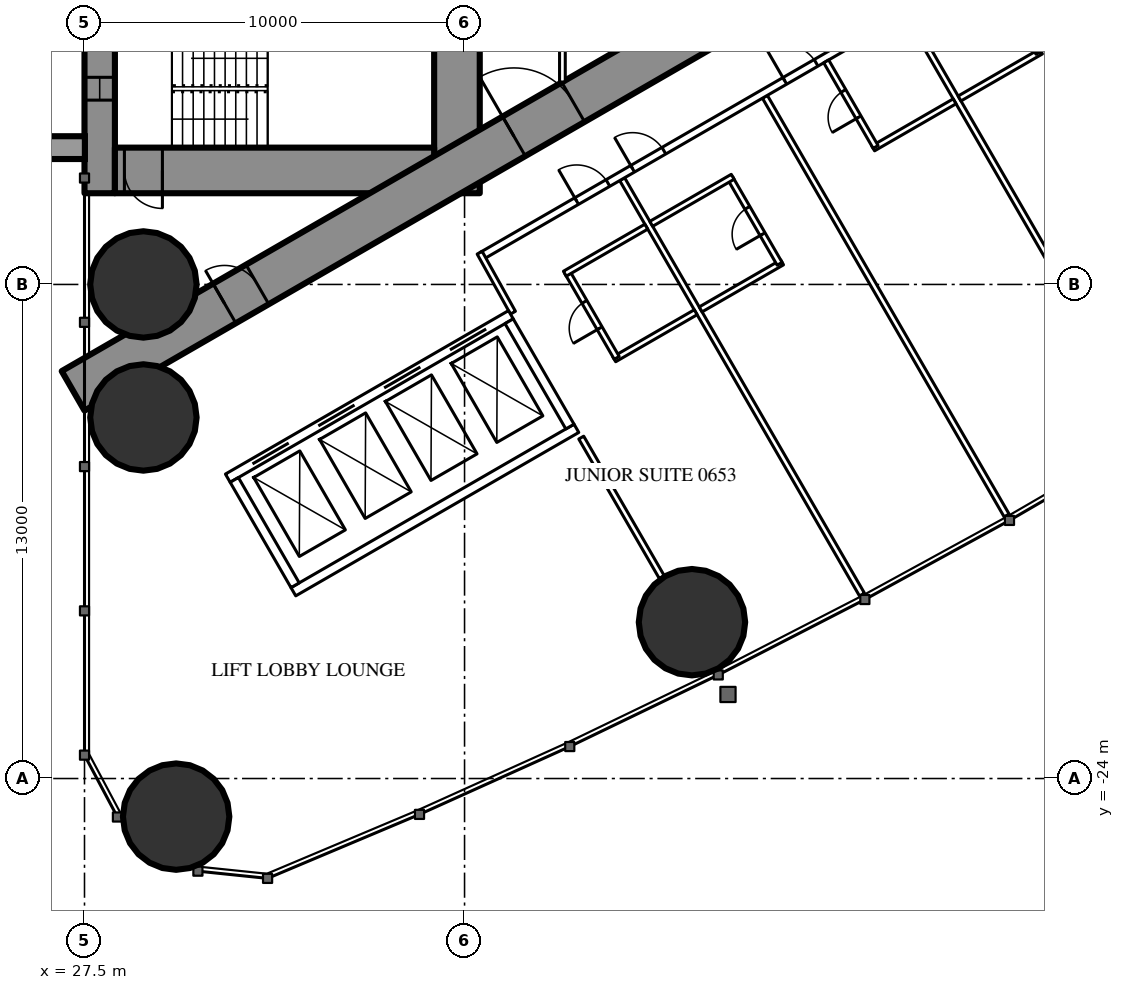
"""IFC4 building model, lengths in metres.
Left out: names, types, materials, properties, quantities, classifications, styles, units other than length and angle.
Written with IfcOpenShell. Run it as: python <this file> out.ifc"""

import sys

from ifc_helpers import new_model, si_unit, direction, frame, frame_2d, origin, origin_2d, place, context, subcontext, project, spatial, rectangle, hollow_circle, extrude, element, fill, save


model = new_model("IFC4")
c1 = context("Model", 3, precision=1e-05, world=origin(), true_north=direction((0.0, 1.0)))
c2 = subcontext(c1, "Body", "Model", "MODEL_VIEW")
j1 = project(units=[si_unit("LENGTHUNIT", "METRE"), si_unit("PLANEANGLEUNIT", "RADIAN")], contexts=[c1])
p1 = place(None, origin())
s1 = spatial("IfcSite", under=j1, at=p1, CompositionType="ELEMENT")
p2 = place(p1, origin())
s2 = spatial("IfcBuilding", under=s1, at=p2, CompositionType="ELEMENT")
p3 = place(p2, frame((0.0, 0.0, 28.5)))
s3 = spatial("IfcBuildingStorey", under=s2, at=p3, CompositionType="ELEMENT", Elevation=28.5)
for number, where, z_axis, x_axis in (
    (1, (29.911, -25.002, 0.0), (0.0, 0.0, 1.0), (1.0, 0.0, 0.0)),
    (2, (29.05, -11.0, 0.0), (0.0, 0.0, 1.0), (1.0, 0.0, 0.0)),
    (3, (29.05, -14.5, 0.0), (0.0, 0.0, 1.0), (1.0, 0.0, 0.0)),
    (4, (43.484, -19.886, 0.0), (0.0, 0.0, 1.0), (1.0, 0.0, 0.0)),
):
    element("IfcColumn", number, at=place(p3, frame(where, z_axis=z_axis, x_axis=x_axis)), inside=s3, PredefinedType="COLUMN", context=c2, shape_type="SweptSolid", body=[
        extrude(hollow_circle(Radius=1.4, WallThickness=0.12, at=origin_2d()), origin(), (0.0, 0.0, 1.0), 3.5),
    ])
p4 = place(p3, frame((27.9, -8.6, 0.0), z_axis=(0.0, 0.0, 1.0), x_axis=(0.0, 1.0, 0.0)))
e5 = element("IfcWall", 5, at=p4, inside=s3, PredefinedType="SHEAR", context=c2, shape_type="SweptSolid", body=[
    extrude(rectangle(XDim=17.2, YDim=0.8, at=frame_2d((8.6, 0.0))), origin(), (0.0, 0.0, 1.0), 3.5),
])
p5 = place(p4, frame((2.45, 0.0, 0.6)))
e6 = element("IfcOpeningElement", 6, at=p5, cuts=e5, PredefinedType="OPENING", context=c2, shape_type="SweptSolid", body=[
    extrude(rectangle(XDim=0.6, YDim=2.1, at=frame_2d((0.3, 1.05))), frame((0.0, 0.41, 0.0), z_axis=(0.0, -1.0, 0.0), x_axis=(1.0, 0.0, 0.0)), (0.0, 0.0, 1.0), 0.82),
])
p6 = place(p4, frame((14.15, 0.0, 0.6)))
e7 = element("IfcOpeningElement", 7, at=p6, cuts=e5, PredefinedType="OPENING", context=c2, shape_type="SweptSolid", body=[
    extrude(rectangle(XDim=0.6, YDim=2.1, at=frame_2d((0.3, 1.05))), frame((0.0, 0.41, 0.0), z_axis=(0.0, -1.0, 0.0), x_axis=(1.0, 0.0, 0.0)), (0.0, 0.0, 1.0), 0.82),
])
p7 = place(p3, frame((37.3, -8.6, 0.0), z_axis=(0.0, 0.0, 1.0), x_axis=(0.0, 1.0, 0.0)))
e8 = element("IfcWall", 8, at=p7, inside=s3, PredefinedType="SHEAR", context=c2, shape_type="SweptSolid", body=[
    extrude(rectangle(XDim=17.2, YDim=1.2, at=frame_2d((8.6, 0.0))), origin(), (0.0, 0.0, 1.0), 3.5),
])
p8 = place(p7, frame((7.7, 0.0, 0.0)))
e9 = element("IfcOpeningElement", 9, at=p8, cuts=e8, PredefinedType="OPENING", context=c2, shape_type="SweptSolid", body=[
    extrude(rectangle(XDim=1.8, YDim=2.2, at=frame_2d((0.9, 1.1))), frame((0.0, 0.61, 0.0), z_axis=(0.0, -1.0, 0.0), x_axis=(1.0, 0.0, 0.0)), (0.0, 0.0, 1.0), 1.22),
])
p9 = place(p3, frame((28.3, -8.0, 0.0), z_axis=(0.0, 0.0, 1.0), x_axis=(1.0, 0.0, 0.0)))
e10 = element("IfcWall", 10, at=p9, inside=s3, PredefinedType="SHEAR", context=c2, shape_type="SweptSolid", body=[
    extrude(rectangle(XDim=8.4, YDim=1.2, at=frame_2d((4.2, 0.0))), origin(), (0.0, 0.0, 1.0), 3.5),
])
p10 = place(p9, frame((0.25, 0.0, 0.0)))
e11 = element("IfcOpeningElement", 11, at=p10, cuts=e10, PredefinedType="OPENING", context=c2, shape_type="SweptSolid", body=[
    extrude(rectangle(XDim=1.0, YDim=2.2, at=frame_2d((0.5, 1.1))), frame((0.0, 0.61, 0.0), z_axis=(0.0, -1.0, 0.0), x_axis=(1.0, 0.0, 0.0)), (0.0, 0.0, 1.0), 1.22),
])
p11 = place(p3, frame((27.2, -13.8, 0.0), z_axis=(0.0, 0.0, 1.0), x_axis=(0.866027159892, 0.499996958321, 0.0)))
e12 = element("IfcWall", 12, at=p11, inside=s3, PredefinedType="SHEAR", context=c2, shape_type="SweptSolid", body=[
    extrude(rectangle(XDim=27.947, YDim=1.2, at=frame_2d((13.973, 0.0))), origin(), (0.0, 0.0, 1.0), 3.5),
])
p12 = place(p11, frame((4.6, 0.0, 0.0)))
e13 = element("IfcOpeningElement", 13, at=p12, cuts=e12, PredefinedType="OPENING", context=c2, shape_type="SweptSolid", body=[
    extrude(rectangle(XDim=1.0, YDim=2.2, at=frame_2d((0.5, 1.1))), frame((0.0, 0.61, 0.0), z_axis=(0.0, -1.0, 0.0), x_axis=(1.0, 0.0, 0.0)), (0.0, 0.0, 1.0), 1.22),
])
p13 = place(p11, frame((13.395, 0.0, 0.0)))
e14 = element("IfcOpeningElement", 14, at=p13, cuts=e12, PredefinedType="OPENING", context=c2, shape_type="SweptSolid", body=[
    extrude(rectangle(XDim=1.8, YDim=2.2, at=frame_2d((0.9, 1.1))), frame((0.0, 0.61, 0.0), z_axis=(0.0, -1.0, 0.0), x_axis=(1.0, 0.0, 0.0)), (0.0, 0.0, 1.0), 1.22),
])
p14 = place(p3, frame((41.647, -8.23, 0.0), z_axis=(0.0, 0.0, 1.0), x_axis=(0.49998590462, -0.866033541603, 0.0)))
e15 = element("IfcWall", 15, at=p14, inside=s3, PredefinedType="PARTITIONING", context=c2, shape_type="SweptSolid", body=[
    extrude(rectangle(XDim=12.621, YDim=0.15, at=frame_2d((6.311, 0.0))), origin(), (0.0, 0.0, 1.0), 3.25),
])
p15 = place(p3, frame((45.403, -6.062, 0.0), z_axis=(0.0, 0.0, 1.0), x_axis=(0.500007077968, -0.866021317279, 0.0)))
e16 = element("IfcWall", 16, at=p15, inside=s3, PredefinedType="PARTITIONING", context=c2, shape_type="SweptSolid", body=[
    extrude(rectangle(XDim=12.721, YDim=0.15, at=frame_2d((6.361, 0.0))), origin(), (0.0, 0.0, 1.0), 3.25),
])
p16 = place(p3, frame((49.159, -3.893, 0.0), z_axis=(0.0, 0.0, 1.0), x_axis=(0.499998773722, -0.866026111775, 0.0)))
e17 = element("IfcWall", 17, at=p16, inside=s3, PredefinedType="PARTITIONING", context=c2, shape_type="SweptSolid", body=[
    extrude(rectangle(XDim=9.892, YDim=0.15, at=frame_2d((4.946, 0.0))), origin(), (0.0, 0.0, 1.0), 2.25),
])
p17 = place(p3, frame((40.57, -15.03, 0.0), z_axis=(0.0, 0.0, 1.0), x_axis=(0.500012993597, -0.866017901798, 0.0)))
e18 = element("IfcWall", 18, at=p17, inside=s3, PredefinedType="PARTITIONING", context=c2, shape_type="SweptSolid", body=[
    extrude(rectangle(XDim=4.243, YDim=0.15, at=frame_2d((2.122, 0.0))), origin(), (0.0, 0.0, 1.0), 3.25),
])
p18 = place(p3, frame((37.96, -10.243, 0.0), z_axis=(0.0, 0.0, 1.0), x_axis=(0.866026429433, 0.499998223521, 0.0)))
e19 = element("IfcWall", 19, at=p18, inside=s3, PredefinedType="PARTITIONING", context=c2, shape_type="SweptSolid", body=[
    extrude(rectangle(XDim=20.487, YDim=0.2, at=frame_2d((10.243, 0.0))), origin(), (0.0, 0.0, 1.0), 3.25),
])
p19 = place(p18, frame((4.575, 0.0, 0.0)))
e20 = element("IfcOpeningElement", 20, at=p19, cuts=e19, PredefinedType="OPENING", context=c2, shape_type="SweptSolid", body=[
    extrude(rectangle(XDim=0.95, YDim=2.2, at=frame_2d((0.475, 1.1))), frame((0.0, 0.11, 0.0), z_axis=(0.0, -1.0, 0.0), x_axis=(1.0, 0.0, 0.0)), (0.0, 0.0, 1.0), 0.22),
])
p20 = place(p18, frame((9.199, 0.0, 0.0)))
e21 = element("IfcOpeningElement", 21, at=p20, cuts=e19, PredefinedType="OPENING", context=c2, shape_type="SweptSolid", body=[
    extrude(rectangle(XDim=0.95, YDim=2.2, at=frame_2d((0.475, 1.1))), frame((0.0, 0.11, 0.0), z_axis=(0.0, -1.0, 0.0), x_axis=(1.0, 0.0, 0.0)), (0.0, 0.0, 1.0), 0.22),
])
p21 = place(p18, frame((15.599, 0.0, 0.0)))
e22 = element("IfcOpeningElement", 22, at=p21, cuts=e19, PredefinedType="OPENING", context=c2, shape_type="SweptSolid", body=[
    extrude(rectangle(XDim=0.95, YDim=2.2, at=frame_2d((0.475, 1.1))), frame((0.0, 0.11, 0.0), z_axis=(0.0, -1.0, 0.0), x_axis=(1.0, 0.0, 0.0)), (0.0, 0.0, 1.0), 0.22),
])
p22 = place(p18, frame((2.875, 0.0, 0.0)))
e23 = element("IfcOpeningElement", 23, at=p22, cuts=e19, PredefinedType="OPENING", context=c2, shape_type="SweptSolid", body=[
    extrude(rectangle(XDim=0.95, YDim=2.2, at=frame_2d((0.475, 1.1))), frame((0.0, 0.11, 0.0), z_axis=(0.0, -1.0, 0.0), x_axis=(1.0, 0.0, 0.0)), (0.0, 0.0, 1.0), 0.22),
])
p23 = place(p3, frame((38.773, -11.742, 0.0), z_axis=(0.0, 0.0, 1.0), x_axis=(-0.485528096672, 0.8742210632, 0.0)))
e24 = element("IfcWall", 24, at=p23, inside=s3, PredefinedType="PARTITIONING", context=c2, shape_type="SweptSolid", body=[
    extrude(rectangle(XDim=1.805, YDim=0.15, at=frame_2d((0.903, 0.0))), origin(), (0.0, 0.0, 1.0), 3.25),
])
p24 = place(p3, frame((43.712, -11.657, 0.0), z_axis=(0.0, 0.0, 1.0), x_axis=(0.866006523861, 0.500032699561, 0.0)))
e25 = element("IfcWall", 25, at=p24, inside=s3, PredefinedType="PARTITIONING", context=c2, shape_type="SweptSolid", body=[
    extrude(rectangle(XDim=2.475, YDim=0.15, at=frame_2d((1.237, 0.0))), origin(), (0.0, 0.0, 1.0), 3.25),
])
p25 = place(p3, frame((44.491, -8.205, 0.0), z_axis=(0.0, 0.0, 1.0), x_axis=(0.500047596559, -0.865997922154, 0.0)))
e26 = element("IfcWall", 26, at=p25, inside=s3, PredefinedType="PARTITIONING", context=c2, shape_type="SweptSolid", body=[
    extrude(rectangle(XDim=2.6, YDim=0.15, at=frame_2d((1.3, 0.0))), origin(), (0.0, 0.0, 1.0), 3.25),
])
p26 = place(p25, frame((0.9, 0.0, 0.0)))
e27 = element("IfcOpeningElement", 27, at=p26, cuts=e26, PredefinedType="OPENING", context=c2, shape_type="SweptSolid", body=[
    extrude(rectangle(XDim=0.8, YDim=2.2, at=frame_2d((0.4, 1.1))), frame((0.0, 0.085, 0.0), z_axis=(0.0, -1.0, 0.0), x_axis=(1.0, 0.0, 0.0)), (0.0, 0.0, 1.0), 0.17),
])
for number, where, z_axis, x_axis in (
    (28, (42.412, -9.405, 0.0), (0.0, 0.0, 1.0), (0.866, 0.5, 0.0)),
    (29, (48.251, -7.42, 0.0), (0.0, 0.0, 1.0), (0.866, 0.5, 0.0)),
):
    element("IfcWall", number, at=place(p3, frame(where, z_axis=z_axis, x_axis=x_axis)), inside=s3, PredefinedType="PARTITIONING", context=c2, shape_type="SweptSolid", body=[
        extrude(rectangle(XDim=2.475, YDim=0.15, at=frame_2d((1.237, 0.0))), origin(), (0.0, 0.0, 1.0), 3.25),
    ])
p27 = place(p3, frame((47.016, -5.13, 0.0), z_axis=(0.0, 0.0, 1.0), x_axis=(0.500006934395, -0.866021400173, 0.0)))
e30 = element("IfcWall", 30, at=p27, inside=s3, PredefinedType="PARTITIONING", context=c2, shape_type="SweptSolid", body=[
    extrude(rectangle(XDim=2.6, YDim=0.15, at=frame_2d((1.3, 0.0))), origin(), (0.0, 0.0, 1.0), 3.25),
])
p28 = place(p27, frame((0.9, 0.0, 0.0)))
e31 = element("IfcOpeningElement", 31, at=p28, cuts=e30, PredefinedType="OPENING", context=c2, shape_type="SweptSolid", body=[
    extrude(rectangle(XDim=0.8, YDim=2.2, at=frame_2d((0.4, 1.1))), frame((0.0, 0.085, 0.0), z_axis=(0.0, -1.0, 0.0), x_axis=(1.0, 0.0, 0.0)), (0.0, 0.0, 1.0), 0.17),
])
p29 = place(p3, frame((50.524, -6.107, 0.0), z_axis=(0.0, 0.0, 1.0), x_axis=(0.866031185235, 0.4999899861, 0.0)))
e32 = element("IfcWall", 32, at=p29, inside=s3, PredefinedType="PARTITIONING", context=c2, shape_type="SweptSolid", body=[
    extrude(rectangle(XDim=2.475, YDim=0.15, at=frame_2d((1.238, 0.0))), origin(), (0.0, 0.0, 1.0), 3.25),
])
p30 = place(p3, frame((51.303, -2.656, 0.0), z_axis=(0.0, 0.0, 1.0), x_axis=(0.500047596559, -0.865997922154, 0.0)))
e33 = element("IfcWall", 33, at=p30, inside=s3, PredefinedType="PARTITIONING", context=c2, shape_type="SweptSolid", body=[
    extrude(rectangle(XDim=2.6, YDim=0.15, at=frame_2d((1.3, 0.0))), origin(), (0.0, 0.0, 1.0), 3.25),
])
p31 = place(p30, frame((0.9, 0.0, 0.0)))
e34 = element("IfcOpeningElement", 34, at=p31, cuts=e33, PredefinedType="OPENING", context=c2, shape_type="SweptSolid", body=[
    extrude(rectangle(XDim=0.8, YDim=2.2, at=frame_2d((0.4, 1.1))), frame((0.0, 0.085, 0.0), z_axis=(0.0, -1.0, 0.0), x_axis=(1.0, 0.0, 0.0)), (0.0, 0.0, 1.0), 0.17),
])
p32 = place(p3, frame((41.439, -12.969, 0.0), z_axis=(0.0, 0.0, 1.0), x_axis=(0.866031185235, 0.4999899861, 0.0)))
e35 = element("IfcWall", 35, at=p32, inside=s3, PredefinedType="PARTITIONING", context=c2, shape_type="SweptSolid", body=[
    extrude(rectangle(XDim=2.475, YDim=0.15, at=frame_2d((1.238, 0.0))), origin(), (0.0, 0.0, 1.0), 3.25),
])
p33 = place(p3, frame((40.204, -10.68, 0.0), z_axis=(0.0, 0.0, 1.0), x_axis=(0.500006934395, -0.866021400173, 0.0)))
e36 = element("IfcWall", 36, at=p33, inside=s3, PredefinedType="PARTITIONING", context=c2, shape_type="SweptSolid", body=[
    extrude(rectangle(XDim=2.6, YDim=0.15, at=frame_2d((1.3, 0.0))), origin(), (0.0, 0.0, 1.0), 3.25),
])
p34 = place(p33, frame((0.9, 0.0, 0.0)))
e37 = element("IfcOpeningElement", 37, at=p34, cuts=e36, PredefinedType="OPENING", context=c2, shape_type="SweptSolid", body=[
    extrude(rectangle(XDim=0.8, YDim=2.2, at=frame_2d((0.4, 1.1))), frame((0.0, 0.085, 0.0), z_axis=(0.0, -1.0, 0.0), x_axis=(1.0, 0.0, 0.0)), (0.0, 0.0, 1.0), 0.17),
])
p35 = place(p3, frame((40.139, -10.718, 0.0), z_axis=(0.0, 0.0, 1.0), x_axis=(0.866031185235, 0.4999899861, 0.0)))
e38 = element("IfcWall", 38, at=p35, inside=s3, PredefinedType="PARTITIONING", context=c2, shape_type="SweptSolid", body=[
    extrude(rectangle(XDim=2.475, YDim=0.15, at=frame_2d((1.238, 0.0))), origin(), (0.0, 0.0, 1.0), 3.25),
])
p36 = place(p3, frame((40.075, -5.674, 0.0), z_axis=(0.0, 0.0, 1.0), x_axis=(0.0, 1.0, 0.0)))
e39 = element("IfcWall", 39, at=p36, inside=s3, PredefinedType="PARTITIONING", context=c2, shape_type="SweptSolid", body=[
    extrude(rectangle(XDim=6.874, YDim=0.15, at=frame_2d((3.437, 0.0))), origin(), (0.0, 0.0, 1.0), 3.25),
])
p37 = place(p36, frame((2.537, 0.0, 0.0)))
e40 = element("IfcOpeningElement", 40, at=p37, cuts=e39, PredefinedType="OPENING", context=c2, shape_type="SweptSolid", body=[
    extrude(rectangle(XDim=1.8, YDim=2.2, at=frame_2d((0.9, 1.1))), frame((0.0, 0.085, 0.0), z_axis=(0.0, -1.0, 0.0), x_axis=(1.0, 0.0, 0.0)), (0.0, 0.0, 1.0), 0.17),
])
p38 = place(p3, frame((31.271, -16.097, 0.0), z_axis=(0.0, 0.0, 1.0), x_axis=(0.86604045752, 0.499973925258, 0.0)))
e41 = element("IfcWall", 41, at=p38, inside=s3, PredefinedType="PARTITIONING", context=c2, shape_type="SweptSolid", body=[
    extrude(rectangle(XDim=8.6, YDim=0.25, at=frame_2d((4.3, 0.0))), origin(), (0.0, 0.0, 1.0), 3.25),
])
p39 = place(p38, frame((0.75, 0.0, 0.0)))
e42 = element("IfcOpeningElement", 42, at=p39, cuts=e41, PredefinedType="OPENING", context=c2, shape_type="SweptSolid", body=[
    extrude(rectangle(XDim=1.1, YDim=2.2, at=frame_2d((0.55, 1.1))), frame((0.0, 0.135, 0.0), z_axis=(0.0, -1.0, 0.0), x_axis=(1.0, 0.0, 0.0)), (0.0, 0.0, 1.0), 0.27),
])
p40 = place(p38, frame((2.75, 0.0, 0.0)))
e43 = element("IfcOpeningElement", 43, at=p40, cuts=e41, PredefinedType="OPENING", context=c2, shape_type="SweptSolid", body=[
    extrude(rectangle(XDim=1.1, YDim=2.2, at=frame_2d((0.55, 1.1))), frame((0.0, 0.135, 0.0), z_axis=(0.0, -1.0, 0.0), x_axis=(1.0, 0.0, 0.0)), (0.0, 0.0, 1.0), 0.27),
])
p41 = place(p38, frame((4.75, 0.0, 0.0)))
e44 = element("IfcOpeningElement", 44, at=p41, cuts=e41, PredefinedType="OPENING", context=c2, shape_type="SweptSolid", body=[
    extrude(rectangle(XDim=1.1, YDim=2.2, at=frame_2d((0.55, 1.1))), frame((0.0, 0.135, 0.0), z_axis=(0.0, -1.0, 0.0), x_axis=(1.0, 0.0, 0.0)), (0.0, 0.0, 1.0), 0.27),
])
p42 = place(p38, frame((6.75, 0.0, 0.0)))
e45 = element("IfcOpeningElement", 45, at=p42, cuts=e41, PredefinedType="OPENING", context=c2, shape_type="SweptSolid", body=[
    extrude(rectangle(XDim=1.1, YDim=2.2, at=frame_2d((0.55, 1.1))), frame((0.0, 0.135, 0.0), z_axis=(0.0, -1.0, 0.0), x_axis=(1.0, 0.0, 0.0)), (0.0, 0.0, 1.0), 0.27),
])
p43 = place(p3, frame((32.996, -19.086, 0.0), z_axis=(0.0, 0.0, 1.0), x_axis=(0.866028165386, 0.499995216735, 0.0)))
e46 = element("IfcWall", 46, at=p43, inside=s3, PredefinedType="PARTITIONING", context=c2, shape_type="SweptSolid", body=[
    extrude(rectangle(XDim=8.6, YDim=0.25, at=frame_2d((4.3, 0.0))), origin(), (0.0, 0.0, 1.0), 3.25),
])
for number, where, z_axis, x_axis in (
    (47, (31.441, -16.143, 0.0), (0.0, 0.0, 1.0), (0.5, -0.866, 0.0)),
    (48, (38.673, -11.968, 0.0), (0.0, 0.0, 1.0), (0.5, -0.866, 0.0)),
):
    element("IfcWall", number, at=place(p3, frame(where, z_axis=z_axis, x_axis=x_axis)), inside=s3, PredefinedType="PARTITIONING", context=c2, shape_type="SweptSolid", body=[
        extrude(rectangle(XDim=3.201, YDim=0.25, at=frame_2d((1.6, 0.0))), origin(), (0.0, 0.0, 1.0), 3.25),
    ])
p44 = place(p26, origin())
e49 = element("IfcDoor", 49, at=p44, inside=s3, OperationType="SINGLE_SWING_RIGHT", PredefinedType="DOOR", context=c2, shape_type="SweptSolid", body=[
    extrude(rectangle(XDim=0.8, YDim=2.2, at=frame_2d((0.4, 1.1))), frame((0.0, 0.025, 0.0), z_axis=(0.0, -1.0, 0.0), x_axis=(1.0, 0.0, 0.0)), (0.0, 0.0, 1.0), 0.05),
])
fill(e27, e49)
p45 = place(p19, origin())
e50 = element("IfcDoor", 50, at=p45, inside=s3, OperationType="SINGLE_SWING_LEFT", PredefinedType="DOOR", context=c2, shape_type="SweptSolid", body=[
    extrude(rectangle(XDim=0.95, YDim=2.2, at=frame_2d((0.475, 1.1))), frame((0.0, 0.025, 0.0), z_axis=(0.0, -1.0, 0.0), x_axis=(1.0, 0.0, 0.0)), (0.0, 0.0, 1.0), 0.05),
])
fill(e20, e50)
p46 = place(p28, origin())
e51 = element("IfcDoor", 51, at=p46, inside=s3, OperationType="SINGLE_SWING_RIGHT", PredefinedType="DOOR", context=c2, shape_type="SweptSolid", body=[
    extrude(rectangle(XDim=0.8, YDim=2.2, at=frame_2d((0.4, 1.1))), frame((0.0, 0.025, 0.0), z_axis=(0.0, -1.0, 0.0), x_axis=(1.0, 0.0, 0.0)), (0.0, 0.0, 1.0), 0.05),
])
fill(e31, e51)
p47 = place(p20, origin())
e52 = element("IfcDoor", 52, at=p47, inside=s3, OperationType="SINGLE_SWING_LEFT", PredefinedType="DOOR", context=c2, shape_type="SweptSolid", body=[
    extrude(rectangle(XDim=0.95, YDim=2.2, at=frame_2d((0.475, 1.1))), frame((0.0, 0.025, 0.0), z_axis=(0.0, -1.0, 0.0), x_axis=(1.0, 0.0, 0.0)), (0.0, 0.0, 1.0), 0.05),
])
fill(e21, e52)
p48 = place(p34, origin())
e53 = element("IfcDoor", 53, at=p48, inside=s3, OperationType="SINGLE_SWING_RIGHT", PredefinedType="DOOR", context=c2, shape_type="SweptSolid", body=[
    extrude(rectangle(XDim=0.8, YDim=2.2, at=frame_2d((0.4, 1.1))), frame((0.0, 0.025, 0.0), z_axis=(0.0, -1.0, 0.0), x_axis=(1.0, 0.0, 0.0)), (0.0, 0.0, 1.0), 0.05),
])
fill(e37, e53)
p49 = place(p22, origin())
e54 = element("IfcDoor", 54, at=p49, inside=s3, OperationType="SINGLE_SWING_LEFT", PredefinedType="DOOR", context=c2, shape_type="SweptSolid", body=[
    extrude(rectangle(XDim=0.95, YDim=2.2, at=frame_2d((0.475, 1.1))), frame((0.0, 0.025, 0.0), z_axis=(0.0, -1.0, 0.0), x_axis=(1.0, 0.0, 0.0)), (0.0, 0.0, 1.0), 0.05),
])
fill(e23, e54)
p50 = place(p12, origin())
e55 = element("IfcDoor", 55, at=p50, inside=s3, OperationType="SINGLE_SWING_LEFT", PredefinedType="DOOR", context=c2, shape_type="SweptSolid", body=[
    extrude(rectangle(XDim=1.0, YDim=2.2, at=frame_2d((0.5, 1.1))), frame((0.0, 0.025, 0.0), z_axis=(0.0, -1.0, 0.0), x_axis=(1.0, 0.0, 0.0)), (0.0, 0.0, 1.0), 0.05),
])
fill(e13, e55)
p51 = place(p13, origin())
e56 = element("IfcDoor", 56, at=p51, inside=s3, OperationType="DOUBLE_DOOR_SINGLE_SWING", PredefinedType="DOOR", context=c2, shape_type="SweptSolid", body=[
    extrude(rectangle(XDim=1.8, YDim=2.2, at=frame_2d((0.9, 1.1))), frame((0.0, 0.025, 0.0), z_axis=(0.0, -1.0, 0.0), x_axis=(1.0, 0.0, 0.0)), (0.0, 0.0, 1.0), 0.05),
])
fill(e14, e56)
p52 = place(p10, origin())
e57 = element("IfcDoor", 57, at=p52, inside=s3, OperationType="SINGLE_SWING_RIGHT", PredefinedType="DOOR", context=c2, shape_type="SweptSolid", body=[
    extrude(rectangle(XDim=1.0, YDim=2.2, at=frame_2d((0.5, 1.1))), frame((0.0, 0.025, 0.0), z_axis=(0.0, -1.0, 0.0), x_axis=(1.0, 0.0, 0.0)), (0.0, 0.0, 1.0), 0.05),
])
fill(e11, e57)
p53 = place(p39, origin())
e58 = element("IfcDoor", 58, at=p53, inside=s3, OperationType="DOUBLE_DOOR_SLIDING", PredefinedType="USERDEFINED", context=c2, shape_type="SweptSolid", body=[
    extrude(rectangle(XDim=1.1, YDim=2.2, at=frame_2d((0.55, 1.1))), frame((0.0, 0.025, 0.0), z_axis=(0.0, -1.0, 0.0), x_axis=(1.0, 0.0, 0.0)), (0.0, 0.0, 1.0), 0.05),
])
fill(e42, e58)
p54 = place(p40, origin())
e59 = element("IfcDoor", 59, at=p54, inside=s3, OperationType="DOUBLE_DOOR_SLIDING", PredefinedType="USERDEFINED", context=c2, shape_type="SweptSolid", body=[
    extrude(rectangle(XDim=1.1, YDim=2.2, at=frame_2d((0.55, 1.1))), frame((0.0, 0.025, 0.0), z_axis=(0.0, -1.0, 0.0), x_axis=(1.0, 0.0, 0.0)), (0.0, 0.0, 1.0), 0.05),
])
fill(e43, e59)
p55 = place(p41, origin())
e60 = element("IfcDoor", 60, at=p55, inside=s3, OperationType="DOUBLE_DOOR_SLIDING", PredefinedType="USERDEFINED", context=c2, shape_type="SweptSolid", body=[
    extrude(rectangle(XDim=1.1, YDim=2.2, at=frame_2d((0.55, 1.1))), frame((0.0, 0.025, 0.0), z_axis=(0.0, -1.0, 0.0), x_axis=(1.0, 0.0, 0.0)), (0.0, 0.0, 1.0), 0.05),
])
fill(e44, e60)
p56 = place(p42, origin())
e61 = element("IfcDoor", 61, at=p56, inside=s3, OperationType="DOUBLE_DOOR_SLIDING", PredefinedType="USERDEFINED", context=c2, shape_type="SweptSolid", body=[
    extrude(rectangle(XDim=1.1, YDim=2.2, at=frame_2d((0.55, 1.1))), frame((0.0, 0.025, 0.0), z_axis=(0.0, -1.0, 0.0), x_axis=(1.0, 0.0, 0.0)), (0.0, 0.0, 1.0), 0.05),
])
fill(e45, e61)
p57 = place(p5, origin())
e62 = element("IfcWindow", 62, at=p57, inside=s3, PartitioningType="SINGLE_PANEL", PredefinedType="WINDOW", context=c2, shape_type="SweptSolid", body=[
    extrude(rectangle(XDim=0.6, YDim=2.1, at=frame_2d((0.3, 1.05))), frame((0.0, 0.03, 0.0), z_axis=(0.0, -1.0, 0.0), x_axis=(1.0, 0.0, 0.0)), (0.0, 0.0, 1.0), 0.06),
])
fill(e6, e62)
save(model, sys.argv[1])
